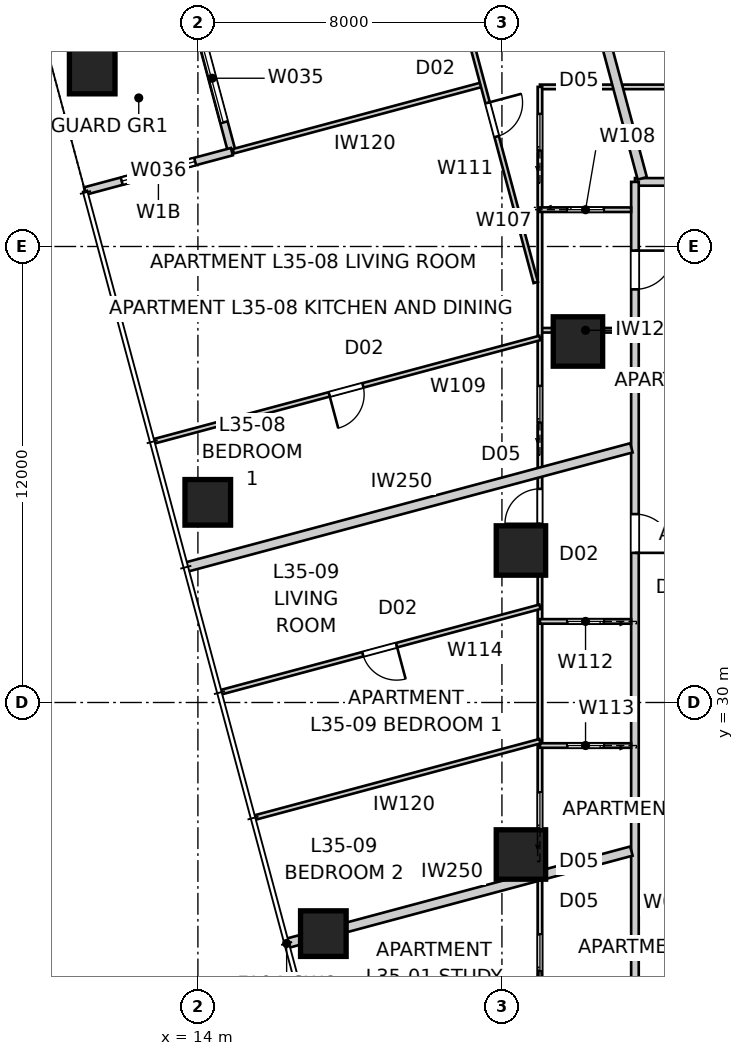
"""IFC4 building model, lengths in metres.
Left out: names, types, materials, properties, quantities, classifications, styles, units other than length and angle.
Written with IfcOpenShell. Run it as: python <this file> out.ifc"""

import sys

from ifc_helpers import new_model, si_unit, direction, frame, frame_2d, origin, origin_2d, place, context, subcontext, project, spatial, rectangle, extrude, element, fill, save


model = new_model("IFC4")
c1 = context("Model", 3, precision=1e-05, world=origin(), true_north=direction((0.0, 1.0)))
c2 = subcontext(c1, "Body", "Model", "MODEL_VIEW")
j1 = project(units=[si_unit("LENGTHUNIT", "METRE"), si_unit("PLANEANGLEUNIT", "RADIAN")], contexts=[c1])
p1 = place(None, origin())
s1 = spatial("IfcSite", under=j1, at=p1, CompositionType="ELEMENT")
p2 = place(p1, origin())
s2 = spatial("IfcBuilding", under=s1, at=p2, CompositionType="ELEMENT")
p3 = place(p2, frame((0.0, 0.0, 128.6)))
s3 = spatial("IfcBuildingStorey", under=s2, at=p3, CompositionType="ELEMENT", Elevation=128.6)
for number, where, z_axis, x_axis in (
    (1, (11.219, 46.617, 0.0), (0.0, 0.0, 1.0), (1.0, 0.0, 0.0)),
    (2, (14.26, 35.267, 0.0), (0.0, 0.0, 1.0), (1.0, 0.0, 0.0)),
    (3, (17.301, 23.918, 0.0), (0.0, 0.0, 1.0), (1.0, 0.0, 0.0)),
):
    element("IfcColumn", number, at=place(p3, frame(where, z_axis=z_axis, x_axis=x_axis)), inside=s3, PredefinedType="COLUMN", context=c2, shape_type="SweptSolid", body=[
        extrude(rectangle(XDim=1.2, YDim=1.2, at=origin_2d()), origin(), (0.0, 0.0, 1.0), 3.4),
    ])
for number, where, z_axis, x_axis in (
    (4, (24.0, 39.5, 0.0), (0.0, 0.0, 1.0), (1.0, 0.0, 0.0)),
    (5, (22.5, 34.0, 0.0), (0.0, 0.0, 1.0), (1.0, 0.0, 0.0)),
    (6, (22.5, 26.0, 0.0), (0.0, 0.0, 1.0), (1.0, 0.0, 0.0)),
):
    element("IfcColumn", number, at=place(p3, frame(where, z_axis=z_axis, x_axis=x_axis)), inside=s3, PredefinedType="COLUMN", context=c2, shape_type="SweptSolid", body=[
        extrude(rectangle(XDim=1.3, YDim=1.3, at=origin_2d()), origin(), (0.0, 0.0, 1.0), 3.4),
    ])
p4 = place(p3, frame((13.857, 48.359, 0.0), z_axis=(0.0, 0.0, 1.0), x_axis=(0.258843877716, -0.965919172068, 0.0)))
e7 = element("IfcWall", 7, at=p4, inside=s3, PredefinedType="SOLIDWALL", context=c2, shape_type="SweptSolid", body=[
    extrude(rectangle(XDim=4.0, YDim=0.2, at=frame_2d((2.0, 0.0))), origin(), (0.0, 0.0, 1.0), 3.25),
])
p5 = place(p4, frame((0.8, 0.0, 0.0)))
e8 = element("IfcOpeningElement", 8, at=p5, cuts=e7, PredefinedType="OPENING", context=c2, shape_type="SweptSolid", body=[
    extrude(rectangle(XDim=2.4, YDim=2.1, at=frame_2d((1.2, 1.05))), frame((0.0, 0.11, 0.0), z_axis=(0.0, -1.0, 0.0), x_axis=(1.0, 0.0, 0.0)), (0.0, 0.0, 1.0), 0.22),
])
p6 = place(p3, frame((14.893, 44.496, 0.0), z_axis=(0.0, 0.0, 1.0), x_axis=(-0.965934430412, -0.258786931944, 0.0)))
e9 = element("IfcWall", 9, at=p6, inside=s3, PredefinedType="SOLIDWALL", context=c2, shape_type="SweptSolid", body=[
    extrude(rectangle(XDim=4.0, YDim=0.2, at=frame_2d((2.0, 0.0))), origin(), (0.0, 0.0, 1.0), 3.25),
])
p7 = place(p6, frame((1.0, 0.0, 0.45)))
e10 = element("IfcOpeningElement", 10, at=p7, cuts=e9, PredefinedType="OPENING", context=c2, shape_type="SweptSolid", body=[
    extrude(rectangle(XDim=2.0, YDim=1.8, at=frame_2d((1.0, 0.9))), frame((0.0, 0.11, 0.0), z_axis=(0.0, -1.0, 0.0), x_axis=(1.0, 0.0, 0.0)), (0.0, 0.0, 1.0), 0.22),
])
p8 = place(p3, frame((52.52, 43.7, 0.0), z_axis=(0.0, 0.0, 1.0), x_axis=(-1.0, 0.0, 0.0)))
e11 = element("IfcWall", 11, at=p8, inside=s3, PredefinedType="PARTITIONING", context=c2, shape_type="SweptSolid", body=[
    extrude(rectangle(XDim=27.02, YDim=0.2, at=frame_2d((13.51, 0.0))), origin(), (0.0, 0.0, 1.0), 3.25),
])
p9 = place(p8, frame((22.208, 0.0, 0.0)))
e12 = element("IfcOpeningElement", 12, at=p9, cuts=e11, PredefinedType="OPENING", context=c2, shape_type="SweptSolid", body=[
    extrude(rectangle(XDim=1.02, YDim=2.34, at=frame_2d((0.51, 1.17))), frame((0.0, 0.11, 0.0), z_axis=(0.0, -1.0, 0.0), x_axis=(1.0, 0.0, 0.0)), (0.0, 0.0, 1.0), 0.22),
])
p10 = place(p8, frame((1.856, 0.0, 0.0)))
e13 = element("IfcOpeningElement", 13, at=p10, cuts=e11, PredefinedType="OPENING", context=c2, shape_type="SweptSolid", body=[
    extrude(rectangle(XDim=1.02, YDim=2.34, at=frame_2d((0.51, 1.17))), frame((0.0, 0.11, 0.0), z_axis=(0.0, -1.0, 0.0), x_axis=(1.0, 0.0, 0.0)), (0.0, 0.0, 1.0), 0.22),
])
p11 = place(p3, frame((25.5, 43.7, 0.0), z_axis=(0.0, 0.0, 1.0), x_axis=(0.0, -1.0, 0.0)))
e14 = element("IfcWall", 14, at=p11, inside=s3, PredefinedType="PARTITIONING", context=c2, shape_type="SweptSolid", body=[
    extrude(rectangle(XDim=28.2, YDim=0.2, at=frame_2d((14.1, 0.0))), origin(), (0.0, 0.0, 1.0), 3.25),
])
p12 = place(p11, frame((8.742, 0.0, 0.0)))
e15 = element("IfcOpeningElement", 15, at=p12, cuts=e14, PredefinedType="OPENING", context=c2, shape_type="SweptSolid", body=[
    extrude(rectangle(XDim=1.02, YDim=2.34, at=frame_2d((0.51, 1.17))), frame((0.0, 0.11, 0.0), z_axis=(0.0, -1.0, 0.0), x_axis=(1.0, 0.0, 0.0)), (0.0, 0.0, 1.0), 0.22),
])
p13 = place(p11, frame((1.808, 0.0, 0.0)))
e16 = element("IfcOpeningElement", 16, at=p13, cuts=e14, PredefinedType="OPENING", context=c2, shape_type="SweptSolid", body=[
    extrude(rectangle(XDim=1.02, YDim=2.1, at=frame_2d((0.51, 1.05))), frame((0.0, 0.11, 0.0), z_axis=(0.0, -1.0, 0.0), x_axis=(1.0, 0.0, 0.0)), (0.0, 0.0, 1.0), 0.22),
])
p14 = place(p3, frame((23.758, 51.012, 0.0), z_axis=(0.0, 0.0, 1.0), x_axis=(0.258805213744, -0.965929532284, 0.0)))
e17 = element("IfcWall", 17, at=p14, inside=s3, PredefinedType="PARTITIONING", context=c2, shape_type="SweptSolid", body=[
    extrude(rectangle(XDim=7.473, YDim=0.25, at=frame_2d((3.737, 0.0))), origin(), (0.0, 0.0, 1.0), 3.25),
])
p15 = place(p3, frame((16.335, 23.659, 0.0), z_axis=(0.0, 0.0, 1.0), x_axis=(0.965927049013, 0.258814481793, 0.0)))
e18 = element("IfcWall", 18, at=p15, inside=s3, PredefinedType="PARTITIONING", context=c2, shape_type="SweptSolid", body=[
    extrude(rectangle(XDim=9.392, YDim=0.25, at=frame_2d((4.696, 0.0))), origin(), (0.0, 0.0, 1.0), 3.25),
])
p16 = place(p3, frame((13.682, 33.56, 0.0), z_axis=(0.0, 0.0, 1.0), x_axis=(0.965924438766, 0.258824223352, 0.0)))
e19 = element("IfcWall", 19, at=p16, inside=s3, PredefinedType="PARTITIONING", context=c2, shape_type="SweptSolid", body=[
    extrude(rectangle(XDim=12.138, YDim=0.25, at=frame_2d((6.069, 0.0))), origin(), (0.0, 0.0, 1.0), 3.25),
])
p17 = place(p3, frame((23.0, 14.833, 0.0), z_axis=(0.0, 0.0, 1.0), x_axis=(0.0, 1.0, 0.0)))
e20 = element("IfcWall", 20, at=p17, inside=s3, PredefinedType="PARTITIONING", context=c2, shape_type="SweptSolid", body=[
    extrude(rectangle(XDim=14.034, YDim=0.12, at=frame_2d((7.017, 0.0))), origin(), (0.0, 0.0, 1.0), 2.55),
])
p18 = place(p17, frame((11.843, 0.0, 0.0)))
e21 = element("IfcOpeningElement", 21, at=p18, cuts=e20, PredefinedType="OPENING", context=c2, shape_type="SweptSolid", body=[
    extrude(rectangle(XDim=0.96, YDim=2.1, at=frame_2d((0.48, 1.05))), frame((0.0, 0.07, 0.0), z_axis=(0.0, -1.0, 0.0), x_axis=(1.0, 0.0, 0.0)), (0.0, 0.0, 1.0), 0.14),
])
p19 = place(p17, frame((8.104, 0.0, 0.0)))
e22 = element("IfcOpeningElement", 22, at=p19, cuts=e20, PredefinedType="OPENING", context=c2, shape_type="SweptSolid", body=[
    extrude(rectangle(XDim=0.96, YDim=2.1, at=frame_2d((0.48, 1.05))), frame((0.0, 0.07, 0.0), z_axis=(0.0, -1.0, 0.0), x_axis=(1.0, 0.0, 0.0)), (0.0, 0.0, 1.0), 0.14),
])
p20 = place(p3, frame((23.0, 46.2, 0.0), z_axis=(0.0, 0.0, 1.0), x_axis=(1.0, 0.0, 0.0)))
e23 = element("IfcWall", 23, at=p20, inside=s3, PredefinedType="PARTITIONING", context=c2, shape_type="SweptSolid", body=[
    extrude(rectangle(XDim=33.2, YDim=0.12, at=frame_2d((16.6, 0.0))), origin(), (0.0, 0.0, 1.0), 2.55),
])
p21 = place(p20, frame((5.844, 0.0, 0.0)))
e24 = element("IfcOpeningElement", 24, at=p21, cuts=e23, PredefinedType="OPENING", context=c2, shape_type="SweptSolid", body=[
    extrude(rectangle(XDim=0.92, YDim=2.34, at=frame_2d((0.46, 1.17))), frame((0.0, 0.07, 0.0), z_axis=(0.0, -1.0, 0.0), x_axis=(1.0, 0.0, 0.0)), (0.0, 0.0, 1.0), 0.14),
])
p22 = place(p20, frame((3.382, 0.0, 0.0)))
e25 = element("IfcOpeningElement", 25, at=p22, cuts=e23, PredefinedType="OPENING", context=c2, shape_type="SweptSolid", body=[
    extrude(rectangle(XDim=0.92, YDim=2.34, at=frame_2d((0.46, 1.17))), frame((0.0, 0.07, 0.0), z_axis=(0.0, -1.0, 0.0), x_axis=(1.0, 0.0, 0.0)), (0.0, 0.0, 1.0), 0.14),
])
p23 = place(p20, frame((9.452, 0.0, 0.0)))
e26 = element("IfcOpeningElement", 26, at=p23, cuts=e23, PredefinedType="OPENING", context=c2, shape_type="SweptSolid", body=[
    extrude(rectangle(XDim=0.92, YDim=2.34, at=frame_2d((0.46, 1.17))), frame((0.0, 0.07, 0.0), z_axis=(0.0, -1.0, 0.0), x_axis=(1.0, 0.0, 0.0)), (0.0, 0.0, 1.0), 0.14),
])
p24 = place(p20, frame((27.775, 0.0, 0.0)))
e27 = element("IfcOpeningElement", 27, at=p24, cuts=e23, PredefinedType="OPENING", context=c2, shape_type="SweptSolid", body=[
    extrude(rectangle(XDim=0.92, YDim=2.34, at=frame_2d((0.46, 1.17))), frame((0.0, 0.07, 0.0), z_axis=(0.0, -1.0, 0.0), x_axis=(1.0, 0.0, 0.0)), (0.0, 0.0, 1.0), 0.14),
])
p25 = place(p20, frame((15.05, 0.0, 0.0)))
e28 = element("IfcOpeningElement", 28, at=p25, cuts=e23, PredefinedType="OPENING", context=c2, shape_type="SweptSolid", body=[
    extrude(rectangle(XDim=0.96, YDim=2.1, at=frame_2d((0.48, 1.05))), frame((0.0, 0.07, 0.0), z_axis=(0.0, -1.0, 0.0), x_axis=(1.0, 0.0, 0.0)), (0.0, 0.0, 1.0), 0.14),
])
p26 = place(p3, frame((25.4, 39.795, 0.0), z_axis=(0.0, 0.0, 1.0), x_axis=(-1.0, 0.0, 0.0)))
e29 = element("IfcWall", 29, at=p26, inside=s3, PredefinedType="PARTITIONING", context=c2, shape_type="SweptSolid", body=[
    extrude(rectangle(XDim=2.4, YDim=0.12, at=frame_2d((1.2, 0.0))), origin(), (0.0, 0.0, 1.0), 3.25),
])
p27 = place(p3, frame((23.0, 28.93, 0.0), z_axis=(0.0, 0.0, 1.0), x_axis=(0.0, 1.0, 0.0)))
e30 = element("IfcWall", 30, at=p27, inside=s3, PredefinedType="PARTITIONING", context=c2, shape_type="SweptSolid", body=[
    extrude(rectangle(XDim=17.27, YDim=0.12, at=frame_2d((8.635, 0.0))), origin(), (0.0, 0.0, 1.0), 2.55),
])
p28 = place(p27, frame((5.772, 0.0, 0.0)))
e31 = element("IfcOpeningElement", 31, at=p28, cuts=e30, PredefinedType="OPENING", context=c2, shape_type="SweptSolid", body=[
    extrude(rectangle(XDim=0.92, YDim=2.34, at=frame_2d((0.46, 1.17))), frame((0.0, 0.07, 0.0), z_axis=(0.0, -1.0, 0.0), x_axis=(1.0, 0.0, 0.0)), (0.0, 0.0, 1.0), 0.14),
])
p29 = place(p27, frame((15.599, 0.0, 0.0)))
e32 = element("IfcOpeningElement", 32, at=p29, cuts=e30, PredefinedType="OPENING", context=c2, shape_type="SweptSolid", body=[
    extrude(rectangle(XDim=0.96, YDim=2.1, at=frame_2d((0.48, 1.05))), frame((0.0, 0.07, 0.0), z_axis=(0.0, -1.0, 0.0), x_axis=(1.0, 0.0, 0.0)), (0.0, 0.0, 1.0), 0.14),
])
p30 = place(p27, frame((8.441, 0.0, 0.0)))
e33 = element("IfcOpeningElement", 33, at=p30, cuts=e30, PredefinedType="OPENING", context=c2, shape_type="SweptSolid", body=[
    extrude(rectangle(XDim=0.96, YDim=2.1, at=frame_2d((0.48, 1.05))), frame((0.0, 0.07, 0.0), z_axis=(0.0, -1.0, 0.0), x_axis=(1.0, 0.0, 0.0)), (0.0, 0.0, 1.0), 0.14),
])
p31 = place(p3, frame((23.0, 42.968, 0.0), z_axis=(0.0, 0.0, 1.0), x_axis=(1.0, 0.0, 0.0)))
e34 = element("IfcWall", 34, at=p31, inside=s3, PredefinedType="PARTITIONING", context=c2, shape_type="SweptSolid", body=[
    extrude(rectangle(XDim=2.4, YDim=0.12, at=frame_2d((1.2, 0.0))), origin(), (0.0, 0.0, 1.0), 3.25),
])
p32 = place(p31, frame((0.72, 0.0, 0.0)))
e35 = element("IfcOpeningElement", 35, at=p32, cuts=e34, PredefinedType="OPENING", context=c2, shape_type="SweptSolid", body=[
    extrude(rectangle(XDim=0.96, YDim=2.1, at=frame_2d((0.48, 1.05))), frame((0.0, 0.07, 0.0), z_axis=(0.0, -1.0, 0.0), x_axis=(1.0, 0.0, 0.0)), (0.0, 0.0, 1.0), 0.14),
])
p33 = place(p3, frame((23.0, 39.594, 0.0), z_axis=(0.0, 0.0, 1.0), x_axis=(-0.9659257847, -0.258819200315, 0.0)))
e36 = element("IfcWall", 36, at=p33, inside=s3, PredefinedType="PARTITIONING", context=c2, shape_type="SweptSolid", body=[
    extrude(rectangle(XDim=10.522, YDim=0.12, at=frame_2d((5.261, 0.0))), origin(), (0.0, 0.0, 1.0), 2.722),
])
p34 = place(p33, frame((4.821, 0.0, 0.0)))
e37 = element("IfcOpeningElement", 37, at=p34, cuts=e36, PredefinedType="OPENING", context=c2, shape_type="SweptSolid", body=[
    extrude(rectangle(XDim=0.92, YDim=2.34, at=frame_2d((0.46, 1.17))), frame((0.0, 0.07, 0.0), z_axis=(0.0, -1.0, 0.0), x_axis=(1.0, 0.0, 0.0)), (0.0, 0.0, 1.0), 0.14),
])
p35 = place(p3, frame((14.931, 44.506, 0.0), z_axis=(0.0, 0.0, 1.0), x_axis=(0.965922865286, 0.258830095464, 0.0)))
e38 = element("IfcWall", 38, at=p35, inside=s3, PredefinedType="PARTITIONING", context=c2, shape_type="SweptSolid", body=[
    extrude(rectangle(XDim=6.793, YDim=0.12, at=frame_2d((3.396, 0.0))), origin(), (0.0, 0.0, 1.0), 3.25),
])
p36 = place(p3, frame((20.468, 50.089, 0.0), z_axis=(0.0, 0.0, 1.0), x_axis=(0.25881390457, -0.965927203676, 0.0)))
e39 = element("IfcWall", 39, at=p36, inside=s3, PredefinedType="PARTITIONING", context=c2, shape_type="SweptSolid", body=[
    extrude(rectangle(XDim=9.357, YDim=0.12, at=frame_2d((4.678, 0.0))), origin(), (0.0, 0.0, 1.0), 2.638),
])
p37 = place(p36, frame((4.461, 0.0, 0.0)))
e40 = element("IfcOpeningElement", 40, at=p37, cuts=e39, PredefinedType="OPENING", context=c2, shape_type="SweptSolid", body=[
    extrude(rectangle(XDim=0.92, YDim=2.34, at=frame_2d((0.46, 1.17))), frame((0.0, 0.07, 0.0), z_axis=(0.0, -1.0, 0.0), x_axis=(1.0, 0.0, 0.0)), (0.0, 0.0, 1.0), 0.14),
])
p38 = place(p36, frame((1.5, 0.0, 0.0)))
e41 = element("IfcOpeningElement", 41, at=p38, cuts=e39, PredefinedType="OPENING", context=c2, shape_type="SweptSolid", body=[
    extrude(rectangle(XDim=0.92, YDim=2.34, at=frame_2d((0.46, 1.17))), frame((0.0, 0.07, 0.0), z_axis=(0.0, -1.0, 0.0), x_axis=(1.0, 0.0, 0.0)), (0.0, 0.0, 1.0), 0.14),
])
p39 = place(p3, frame((25.4, 32.134, 0.0), z_axis=(0.0, 0.0, 1.0), x_axis=(-1.0, 0.0, 0.0)))
e42 = element("IfcWall", 42, at=p39, inside=s3, PredefinedType="PARTITIONING", context=c2, shape_type="SweptSolid", body=[
    extrude(rectangle(XDim=2.4, YDim=0.12, at=frame_2d((1.2, 0.0))), origin(), (0.0, 0.0, 1.0), 3.25),
])
p40 = place(p39, frame((0.72, 0.0, 0.0)))
e43 = element("IfcOpeningElement", 43, at=p40, cuts=e42, PredefinedType="OPENING", context=c2, shape_type="SweptSolid", body=[
    extrude(rectangle(XDim=0.96, YDim=2.1, at=frame_2d((0.48, 1.05))), frame((0.0, 0.07, 0.0), z_axis=(0.0, -1.0, 0.0), x_axis=(1.0, 0.0, 0.0)), (0.0, 0.0, 1.0), 0.14),
])
p41 = place(p3, frame((25.4, 28.868, 0.0), z_axis=(0.0, 0.0, 1.0), x_axis=(-1.0, 0.0, 0.0)))
e44 = element("IfcWall", 44, at=p41, inside=s3, PredefinedType="PARTITIONING", context=c2, shape_type="SweptSolid", body=[
    extrude(rectangle(XDim=2.4, YDim=0.12, at=frame_2d((1.2, 0.0))), origin(), (0.0, 0.0, 1.0), 3.25),
])
p42 = place(p41, frame((0.72, 0.0, 0.0)))
e45 = element("IfcOpeningElement", 45, at=p42, cuts=e44, PredefinedType="OPENING", context=c2, shape_type="SweptSolid", body=[
    extrude(rectangle(XDim=0.96, YDim=2.1, at=frame_2d((0.48, 1.05))), frame((0.0, 0.07, 0.0), z_axis=(0.0, -1.0, 0.0), x_axis=(1.0, 0.0, 0.0)), (0.0, 0.0, 1.0), 0.14),
])
p43 = place(p3, frame((23.0, 32.519, 0.0), z_axis=(0.0, 0.0, 1.0), x_axis=(-0.965925607751, -0.258819860698, 0.0)))
e46 = element("IfcWall", 46, at=p43, inside=s3, PredefinedType="PARTITIONING", context=c2, shape_type="SweptSolid", body=[
    extrude(rectangle(XDim=8.691, YDim=0.12, at=frame_2d((4.346, 0.0))), origin(), (0.0, 0.0, 1.0), 3.25),
])
p44 = place(p43, frame((3.906, 0.0, 0.0)))
e47 = element("IfcOpeningElement", 47, at=p44, cuts=e46, PredefinedType="OPENING", context=c2, shape_type="SweptSolid", body=[
    extrude(rectangle(XDim=0.92, YDim=2.34, at=frame_2d((0.46, 1.17))), frame((0.0, 0.07, 0.0), z_axis=(0.0, -1.0, 0.0), x_axis=(1.0, 0.0, 0.0)), (0.0, 0.0, 1.0), 0.14),
])
p45 = place(p3, frame((23.0, 28.982, 0.0), z_axis=(0.0, 0.0, 1.0), x_axis=(-0.965927309482, -0.258813509689, 0.0)))
e48 = element("IfcWall", 48, at=p45, inside=s3, PredefinedType="PARTITIONING", context=c2, shape_type="SweptSolid", body=[
    extrude(rectangle(XDim=7.776, YDim=0.12, at=frame_2d((3.888, 0.0))), origin(), (0.0, 0.0, 1.0), 3.25),
])
p46 = place(p5, origin())
e49 = element("IfcDoor", 49, at=p46, inside=s3, OperationType="SLIDING_TO_LEFT", PredefinedType="DOOR", context=c2, shape_type="SweptSolid", body=[
    extrude(rectangle(XDim=2.4, YDim=2.1, at=frame_2d((1.2, 1.05))), frame((0.0, 0.025, 0.0), z_axis=(0.0, -1.0, 0.0), x_axis=(1.0, 0.0, 0.0)), (0.0, 0.0, 1.0), 0.05),
])
fill(e8, e49)
p47 = place(p7, origin())
e50 = element("IfcWindow", 50, at=p47, inside=s3, PartitioningType="SINGLE_PANEL", PredefinedType="WINDOW", context=c2, shape_type="SweptSolid", body=[
    extrude(rectangle(XDim=2.0, YDim=1.8, at=frame_2d((1.0, 0.9))), frame((0.0, 0.03, 0.0), z_axis=(0.0, -1.0, 0.0), x_axis=(1.0, 0.0, 0.0)), (0.0, 0.0, 1.0), 0.06),
])
fill(e10, e50)
p48 = place(p12, origin())
e51 = element("IfcDoor", 51, at=p48, inside=s3, OperationType="SINGLE_SWING_RIGHT", PredefinedType="DOOR", context=c2, shape_type="SweptSolid", body=[
    extrude(rectangle(XDim=1.02, YDim=2.34, at=frame_2d((0.51, 1.17))), frame((0.0, 0.025, 0.0), z_axis=(0.0, -1.0, 0.0), x_axis=(1.0, 0.0, 0.0)), (0.0, 0.0, 1.0), 0.05),
])
fill(e15, e51)
p49 = place(p13, origin())
e52 = element("IfcDoor", 52, at=p49, inside=s3, OperationType="SINGLE_SWING_LEFT", PredefinedType="DOOR", context=c2, shape_type="SweptSolid", body=[
    extrude(rectangle(XDim=1.02, YDim=2.1, at=frame_2d((0.51, 1.05))), frame((0.0, 0.025, 0.0), z_axis=(0.0, -1.0, 0.0), x_axis=(1.0, 0.0, 0.0)), (0.0, 0.0, 1.0), 0.05),
])
fill(e16, e52)
p50 = place(p28, origin())
e53 = element("IfcDoor", 53, at=p50, inside=s3, OperationType="SINGLE_SWING_LEFT", PredefinedType="DOOR", context=c2, shape_type="SweptSolid", body=[
    extrude(rectangle(XDim=0.92, YDim=2.34, at=frame_2d((0.46, 1.17))), frame((0.0, 0.025, 0.0), z_axis=(0.0, -1.0, 0.0), x_axis=(1.0, 0.0, 0.0)), (0.0, 0.0, 1.0), 0.05),
])
fill(e31, e53)
p51 = place(p40, origin())
e54 = element("IfcDoor", 54, at=p51, inside=s3, OperationType="SLIDING_TO_LEFT", PredefinedType="DOOR", context=c2, shape_type="SweptSolid", body=[
    extrude(rectangle(XDim=0.96, YDim=2.1, at=frame_2d((0.48, 1.05))), frame((0.0, 0.025, 0.0), z_axis=(0.0, -1.0, 0.0), x_axis=(1.0, 0.0, 0.0)), (0.0, 0.0, 1.0), 0.05),
])
fill(e43, e54)
p52 = place(p32, origin())
e55 = element("IfcDoor", 55, at=p52, inside=s3, OperationType="SLIDING_TO_LEFT", PredefinedType="DOOR", context=c2, shape_type="SweptSolid", body=[
    extrude(rectangle(XDim=0.96, YDim=2.1, at=frame_2d((0.48, 1.05))), frame((0.0, 0.025, 0.0), z_axis=(0.0, -1.0, 0.0), x_axis=(1.0, 0.0, 0.0)), (0.0, 0.0, 1.0), 0.05),
])
fill(e35, e55)
p53 = place(p44, origin())
e56 = element("IfcDoor", 56, at=p53, inside=s3, OperationType="SINGLE_SWING_LEFT", PredefinedType="DOOR", context=c2, shape_type="SweptSolid", body=[
    extrude(rectangle(XDim=0.92, YDim=2.34, at=frame_2d((0.46, 1.17))), frame((0.0, 0.025, 0.0), z_axis=(0.0, -1.0, 0.0), x_axis=(1.0, 0.0, 0.0)), (0.0, 0.0, 1.0), 0.05),
])
fill(e47, e56)
p54 = place(p42, origin())
e57 = element("IfcDoor", 57, at=p54, inside=s3, OperationType="SLIDING_TO_LEFT", PredefinedType="DOOR", context=c2, shape_type="SweptSolid", body=[
    extrude(rectangle(XDim=0.96, YDim=2.1, at=frame_2d((0.48, 1.05))), frame((0.0, 0.025, 0.0), z_axis=(0.0, -1.0, 0.0), x_axis=(1.0, 0.0, 0.0)), (0.0, 0.0, 1.0), 0.05),
])
fill(e45, e57)
p55 = place(p29, origin())
e58 = element("IfcDoor", 58, at=p55, inside=s3, OperationType="SLIDING_TO_LEFT", PredefinedType="DOOR", context=c2, shape_type="SweptSolid", body=[
    extrude(rectangle(XDim=0.96, YDim=2.1, at=frame_2d((0.48, 1.05))), frame((0.0, 0.025, 0.0), z_axis=(0.0, -1.0, 0.0), x_axis=(1.0, 0.0, 0.0)), (0.0, 0.0, 1.0), 0.05),
])
fill(e32, e58)
p56 = place(p18, origin())
e59 = element("IfcDoor", 59, at=p56, inside=s3, OperationType="SLIDING_TO_LEFT", PredefinedType="DOOR", context=c2, shape_type="SweptSolid", body=[
    extrude(rectangle(XDim=0.96, YDim=2.1, at=frame_2d((0.48, 1.05))), frame((0.0, 0.025, 0.0), z_axis=(0.0, -1.0, 0.0), x_axis=(1.0, 0.0, 0.0)), (0.0, 0.0, 1.0), 0.05),
])
fill(e21, e59)
p57 = place(p19, origin())
e60 = element("IfcDoor", 60, at=p57, inside=s3, OperationType="SLIDING_TO_LEFT", PredefinedType="DOOR", context=c2, shape_type="SweptSolid", body=[
    extrude(rectangle(XDim=0.96, YDim=2.1, at=frame_2d((0.48, 1.05))), frame((0.0, 0.025, 0.0), z_axis=(0.0, -1.0, 0.0), x_axis=(1.0, 0.0, 0.0)), (0.0, 0.0, 1.0), 0.05),
])
fill(e22, e60)
p58 = place(p37, origin())
e61 = element("IfcDoor", 61, at=p58, inside=s3, OperationType="SINGLE_SWING_LEFT", PredefinedType="DOOR", context=c2, shape_type="SweptSolid", body=[
    extrude(rectangle(XDim=0.92, YDim=2.34, at=frame_2d((0.46, 1.17))), frame((0.0, 0.025, 0.0), z_axis=(0.0, -1.0, 0.0), x_axis=(1.0, 0.0, 0.0)), (0.0, 0.0, 1.0), 0.05),
])
fill(e40, e61)
p59 = place(p34, origin())
e62 = element("IfcDoor", 62, at=p59, inside=s3, OperationType="SINGLE_SWING_RIGHT", PredefinedType="DOOR", context=c2, shape_type="SweptSolid", body=[
    extrude(rectangle(XDim=0.92, YDim=2.34, at=frame_2d((0.46, 1.17))), frame((0.0, 0.025, 0.0), z_axis=(0.0, -1.0, 0.0), x_axis=(1.0, 0.0, 0.0)), (0.0, 0.0, 1.0), 0.05),
])
fill(e37, e62)
p60 = place(p30, origin())
e63 = element("IfcDoor", 63, at=p60, inside=s3, OperationType="SLIDING_TO_LEFT", PredefinedType="DOOR", context=c2, shape_type="SweptSolid", body=[
    extrude(rectangle(XDim=0.96, YDim=2.1, at=frame_2d((0.48, 1.05))), frame((0.0, 0.025, 0.0), z_axis=(0.0, -1.0, 0.0), x_axis=(1.0, 0.0, 0.0)), (0.0, 0.0, 1.0), 0.05),
])
fill(e33, e63)
save(model, sys.argv[1])
